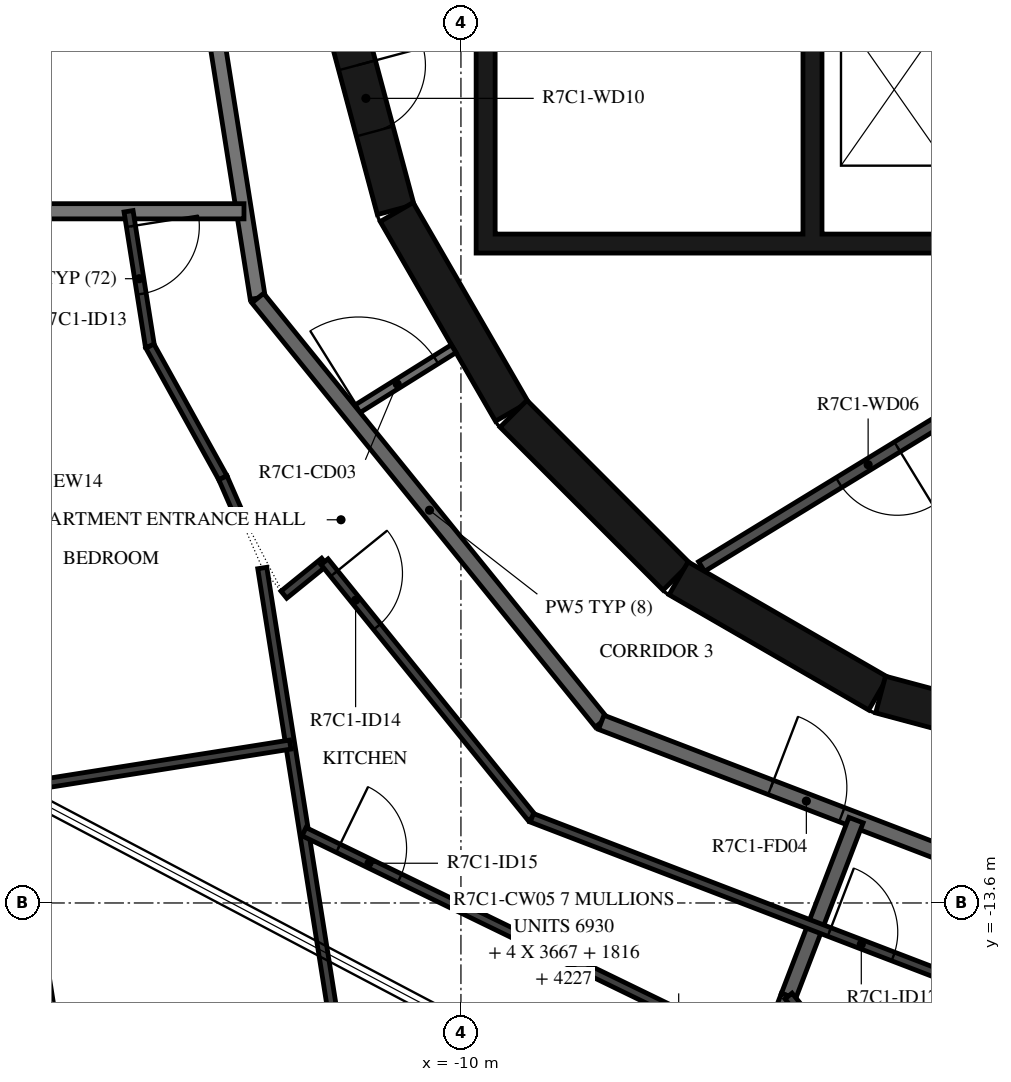
"""IFC4 building model, lengths in metres.
Left out: names, types, materials, properties, quantities, classifications, styles, units other than length and angle.
Written with IfcOpenShell. Run it as: python <this file> out.ifc"""

import sys

from ifc_helpers import new_model, si_unit, direction, frame, frame_2d, origin, place, context, subcontext, project, spatial, polyline, rectangle, outline, extrude, element, fill, save


model = new_model("IFC4")
c1 = context("Model", 3, precision=1e-05, world=origin(), true_north=direction((0.0, 1.0)))
c2 = subcontext(c1, "Body", "Model", "MODEL_VIEW")
j1 = project(units=[si_unit("LENGTHUNIT", "METRE"), si_unit("PLANEANGLEUNIT", "RADIAN")], contexts=[c1])
p1 = place(None, origin())
s1 = spatial("IfcSite", under=j1, at=p1, CompositionType="ELEMENT")
p2 = place(p1, origin())
s2 = spatial("IfcBuilding", under=s1, at=p2, CompositionType="ELEMENT")
p3 = place(p2, frame((0.0, 0.0, 287.9)))
s3 = spatial("IfcBuildingStorey", under=s2, at=p3, CompositionType="ELEMENT", Elevation=287.9)
p4 = place(p3, frame((-11.643, -1.55, 0.0), z_axis=(0.0, 0.0, 1.0), x_axis=(0.258734743916, -0.965948410781, 0.0)))
e1 = element("IfcWall", 1, at=p4, inside=s3, PredefinedType="SHEAR", context=c2, shape_type="SweptSolid", body=[
    extrude(rectangle(XDim=3.033, YDim=0.5, at=frame_2d((1.516, 0.0))), origin(), (0.0, 0.0, 1.0), 3.05),
])
p5 = place(p4, frame((1.066, 0.0, 0.0)))
e2 = element("IfcOpeningElement", 2, at=p5, cuts=e1, PredefinedType="OPENING", context=c2, shape_type="SweptSolid", body=[
    extrude(rectangle(XDim=0.9, YDim=2.1, at=frame_2d((0.45, 1.05))), frame((0.0, 0.26, 0.0), z_axis=(0.0, -1.0, 0.0), x_axis=(1.0, 0.0, 0.0)), (0.0, 0.0, 1.0), 0.52),
])
p6 = place(p3, frame((-10.845, -4.51, 0.0), z_axis=(0.0, 0.0, 1.0), x_axis=(0.500087131594, -0.865975092491, 0.0)))
e3 = element("IfcWall", 3, at=p6, inside=s3, PredefinedType="SHEAR", context=c2, shape_type="SweptSolid", body=[
    extrude(rectangle(XDim=3.033, YDim=0.5, at=frame_2d((1.516, 0.0))), origin(), (0.0, 0.0, 1.0), 3.05),
])
p7 = place(p3, frame((-9.308, -7.164, 0.0), z_axis=(0.0, 0.0, 1.0), x_axis=(0.707106781187, -0.707106781187, 0.0)))
e4 = element("IfcWall", 4, at=p7, inside=s3, PredefinedType="SHEAR", context=c2, shape_type="SweptSolid", body=[
    extrude(rectangle(XDim=3.032, YDim=0.5, at=frame_2d((1.516, 0.0))), origin(), (0.0, 0.0, 1.0), 3.05),
])
for number, where, z_axis, x_axis in (
    (5, (-7.137, -9.329, 0.0), (0.0, 0.0, 1.0), (0.866, -0.5, 0.0)),
    (6, (-4.479, -10.858, 0.0), (0.0, 0.0, 1.0), (0.966, -0.259, 0.0)),
):
    element("IfcWall", number, at=place(p3, frame(where, z_axis=z_axis, x_axis=x_axis)), inside=s3, PredefinedType="SHEAR", context=c2, shape_type="SweptSolid", body=[
        extrude(rectangle(XDim=3.033, YDim=0.5, at=frame_2d((1.516, 0.0))), origin(), (0.0, 0.0, 1.0), 3.05),
    ])
p8 = place(p3, origin())
e7 = element("IfcWall", 7, at=p8, inside=s3, PredefinedType="SHEAR", context=c2, shape_type="SweptSolid", body=[
    extrude(outline(polyline([(9.8, -5.05), (9.8, -4.8), (9.8, -1.9), (9.55, -1.9), (9.55, -4.8), (7.65, -4.8), (7.65, -1.9), (7.4, -1.9), (7.4, -4.8), (5.5, -4.8), (5.5, -1.9), (5.25, -1.9), (5.25, -4.8), (3.35, -4.8), (3.35, -1.9), (3.1, -1.9), (3.1, -4.8), (1.2, -4.8), (1.2, -1.9), (0.95, -1.9), (0.95, -4.8), (-0.95, -4.8), (-0.95, -1.9), (-1.2, -1.9), (-1.2, -4.8), (-3.1, -4.8), (-3.1, -1.9), (-3.35, -1.9), (-3.35, -4.8), (-5.25, -4.8), (-5.25, -1.9), (-5.5, -1.9), (-5.5, -4.8), (-9.55, -4.8), (-9.55, -1.9), (-9.8, -1.9), (-9.8, -4.8), (-9.8, -5.05), (9.8, -5.05)])), origin(), (0.0, 0.0, 1.0), 3.05),
])
p9 = place(p3, frame((-2.451, -6.495, 0.0), z_axis=(0.0, 0.0, 1.0), x_axis=(-0.853250115418, -0.521501908471, 0.0)))
e8 = element("IfcWall", 8, at=p9, inside=s3, PredefinedType="PARTITIONING", context=c2, shape_type="SweptSolid", body=[
    extrude(rectangle(XDim=5.137, YDim=0.15, at=frame_2d((2.569, 0.0))), origin(), (0.0, 0.0, 1.0), 3.05),
])
p10 = place(p9, frame((2.119, 0.0, 0.0)))
e9 = element("IfcOpeningElement", 9, at=p10, cuts=e8, PredefinedType="OPENING", context=c2, shape_type="SweptSolid", body=[
    extrude(rectangle(XDim=0.9, YDim=2.1, at=frame_2d((0.45, 1.05))), frame((0.0, 0.085, 0.0), z_axis=(0.0, -1.0, 0.0), x_axis=(1.0, 0.0, 0.0)), (0.0, 0.0, 1.0), 0.17),
])
p11 = place(p3, frame((-11.449, -7.154, 0.0), z_axis=(0.0, 0.0, 1.0), x_axis=(0.848067047543, 0.529888934468, 0.0)))
e10 = element("IfcWall", 10, at=p11, inside=s3, PredefinedType="PARTITIONING", context=c2, shape_type="SweptSolid", body=[
    extrude(rectangle(XDim=1.596, YDim=0.12, at=frame_2d((0.798, 0.0))), origin(), (0.0, 0.0, 1.0), 3.05),
])
p12 = place(p11, frame((0.12, 0.0, 0.0)))
e11 = element("IfcOpeningElement", 11, at=p12, cuts=e10, PredefinedType="OPENING", context=c2, shape_type="SweptSolid", body=[
    extrude(rectangle(XDim=1.2, YDim=2.1, at=frame_2d((0.6, 1.05))), frame((0.0, 0.07, 0.0), z_axis=(0.0, -1.0, 0.0), x_axis=(1.0, 0.0, 0.0)), (0.0, 0.0, 1.0), 0.14),
])
p13 = place(p3, frame((-13.797, 1.45, 0.0), z_axis=(0.0, 0.0, 1.0), x_axis=(0.156421704315, -0.987690361611, 0.0)))
e12 = element("IfcWall", 12, at=p13, inside=s3, PredefinedType="STANDARD", context=c2, shape_type="SweptSolid", body=[
    extrude(rectangle(XDim=7.181, YDim=0.2, at=frame_2d((3.591, 0.0))), origin(), (0.0, 0.0, 1.0), 3.05),
])
p14 = place(p3, frame((-12.673, -5.643, 0.0), z_axis=(0.0, 0.0, 1.0), x_axis=(0.629302871585, -0.777160148113, 0.0)))
e13 = element("IfcWall", 13, at=p14, inside=s3, PredefinedType="STANDARD", context=c2, shape_type="SweptSolid", body=[
    extrude(rectangle(XDim=7.181, YDim=0.2, at=frame_2d((3.59, 0.0))), origin(), (0.0, 0.0, 1.0), 3.05),
])
p15 = place(p3, frame((-8.154, -11.223, 0.0), z_axis=(0.0, 0.0, 1.0), x_axis=(0.93359073609, -0.358341090983, 0.0)))
e14 = element("IfcWall", 14, at=p15, inside=s3, PredefinedType="STANDARD", context=c2, shape_type="SweptSolid", body=[
    extrude(rectangle(XDim=7.181, YDim=0.2, at=frame_2d((3.59, 0.0))), origin(), (0.0, 0.0, 1.0), 3.05),
])
p16 = place(p15, frame((2.39, 0.0, 0.0)))
e15 = element("IfcOpeningElement", 15, at=p16, cuts=e14, PredefinedType="OPENING", context=c2, shape_type="SweptSolid", body=[
    extrude(rectangle(XDim=1.0, YDim=2.1, at=frame_2d((0.5, 1.05))), frame((0.0, 0.11, 0.0), z_axis=(0.0, -1.0, 0.0), x_axis=(1.0, 0.0, 0.0)), (0.0, 0.0, 1.0), 0.22),
])
p17 = place(p3, frame((-17.002, -4.5, 0.0), z_axis=(0.0, 0.0, 1.0), x_axis=(1.0, 0.0, 0.0)))
e16 = element("IfcWall", 16, at=p17, inside=s3, PredefinedType="STANDARD", context=c2, shape_type="SweptSolid", body=[
    extrude(rectangle(XDim=4.148, YDim=0.2, at=frame_2d((2.074, 0.0))), origin(), (0.0, 0.0, 1.0), 3.05),
])
p18 = place(p3, frame((-5.69, -14.824, 0.0), z_axis=(0.0, 0.0, 1.0), x_axis=(0.358345342952, 0.933589104041, 0.0)))
e17 = element("IfcWall", 17, at=p18, inside=s3, PredefinedType="STANDARD", context=c2, shape_type="SweptSolid", body=[
    extrude(rectangle(XDim=2.479, YDim=0.2, at=frame_2d((1.239, 0.0))), origin(), (0.0, 0.0, 1.0), 3.05),
])
p19 = place(p3, frame((-6.25, -16.282, 0.0), z_axis=(0.0, 0.0, 1.0), x_axis=(0.358360842469, 0.933583154617, 0.0)))
e18 = element("IfcWall", 18, at=p19, inside=s3, PredefinedType="STANDARD", context=c2, shape_type="SweptSolid", body=[
    extrude(rectangle(XDim=1.562, YDim=0.2, at=frame_2d((0.781, 0.0))), origin(), (0.0, 0.0, 1.0), 3.05),
])
p20 = place(p3, frame((-14.373, -4.5, 0.0), z_axis=(0.0, 0.0, 1.0), x_axis=(0.156437152886, -0.987687914878, 0.0)))
e19 = element("IfcWall", 19, at=p20, inside=s3, PredefinedType="PARTITIONING", context=c2, shape_type="SweptSolid", body=[
    extrude(rectangle(XDim=1.796, YDim=0.12, at=frame_2d((0.898, 0.0))), origin(), (0.0, 0.0, 1.0), 3.05),
])
p21 = place(p20, frame((0.2, 0.0, 0.0)))
e20 = element("IfcOpeningElement", 20, at=p21, cuts=e19, PredefinedType="OPENING", context=c2, shape_type="SweptSolid", body=[
    extrude(rectangle(XDim=0.9, YDim=2.1, at=frame_2d((0.45, 1.05))), frame((0.0, 0.07, 0.0), z_axis=(0.0, -1.0, 0.0), x_axis=(1.0, 0.0, 0.0)), (0.0, 0.0, 1.0), 0.14),
])
p22 = place(p3, frame((-14.092, -6.274, 0.0), z_axis=(0.0, 0.0, 1.0), x_axis=(0.484732033151, -0.87466270987, 0.0)))
e21 = element("IfcWall", 21, at=p22, inside=s3, PredefinedType="PARTITIONING", context=c2, shape_type="SweptSolid", body=[
    extrude(rectangle(XDim=1.98, YDim=0.12, at=frame_2d((0.99, 0.0))), origin(), (0.0, 0.0, 1.0), 3.05),
])
p23 = place(p3, frame((-13.132, -8.006, 0.0), z_axis=(0.0, 0.0, 1.0), x_axis=(0.400176548656, -0.916438066596, 0.0)))
e22 = element("IfcWall", 22, at=p23, inside=s3, PredefinedType="PARTITIONING", context=c2, shape_type="SweptSolid", body=[
    extrude(rectangle(XDim=0.578, YDim=0.12, at=frame_2d((0.289, 0.0))), origin(), (0.0, 0.0, 1.0), 3.05),
])
p24 = place(p3, frame((-12.33, -9.544, 0.0), z_axis=(0.0, 0.0, 1.0), x_axis=(0.777046524115, 0.629443166109, 0.0)))
e23 = element("IfcWall", 23, at=p24, inside=s3, PredefinedType="PARTITIONING", context=c2, shape_type="SweptSolid", body=[
    extrude(rectangle(XDim=0.688, YDim=0.12, at=frame_2d((0.344, 0.0))), origin(), (0.0, 0.0, 1.0), 3.05),
])
p25 = place(p3, frame((-11.795, -9.111, 0.0), z_axis=(0.0, 0.0, 1.0), x_axis=(0.62936834401, -0.777107127466, 0.0)))
e24 = element("IfcWall", 24, at=p25, inside=s3, PredefinedType="PARTITIONING", context=c2, shape_type="SweptSolid", body=[
    extrude(rectangle(XDim=4.334, YDim=0.12, at=frame_2d((2.167, 0.0))), origin(), (0.0, 0.0, 1.0), 3.05),
])
p26 = place(p25, frame((0.2, 0.0, 0.0)))
e25 = element("IfcOpeningElement", 25, at=p26, cuts=e24, PredefinedType="OPENING", context=c2, shape_type="SweptSolid", body=[
    extrude(rectangle(XDim=0.9, YDim=2.1, at=frame_2d((0.45, 1.05))), frame((0.0, 0.07, 0.0), z_axis=(0.0, -1.0, 0.0), x_axis=(1.0, 0.0, 0.0)), (0.0, 0.0, 1.0), 0.14),
])
p27 = place(p3, frame((-9.067, -12.479, 0.0), z_axis=(0.0, 0.0, 1.0), x_axis=(0.933579449035, -0.358370495911, 0.0)))
e26 = element("IfcWall", 26, at=p27, inside=s3, PredefinedType="PARTITIONING", context=c2, shape_type="SweptSolid", body=[
    extrude(rectangle(XDim=7.985, YDim=0.12, at=frame_2d((3.992, 0.0))), origin(), (0.0, 0.0, 1.0), 3.05),
])
p28 = place(p27, frame((4.192, 0.0, 0.0)))
e27 = element("IfcOpeningElement", 27, at=p28, cuts=e26, PredefinedType="OPENING", context=c2, shape_type="SweptSolid", body=[
    extrude(rectangle(XDim=0.9, YDim=2.1, at=frame_2d((0.45, 1.05))), frame((0.0, 0.07, 0.0), z_axis=(0.0, -1.0, 0.0), x_axis=(1.0, 0.0, 0.0)), (0.0, 0.0, 1.0), 0.14),
])
p29 = place(p3, frame((-11.185, -18.213, 0.0), z_axis=(0.0, 0.0, 1.0), x_axis=(-0.15642108221, 0.987690460134, 0.0)))
e28 = element("IfcWall", 28, at=p29, inside=s3, PredefinedType="PARTITIONING", context=c2, shape_type="SweptSolid", body=[
    extrude(rectangle(XDim=9.132, YDim=0.12, at=frame_2d((4.566, 0.0))), origin(), (0.0, 0.0, 1.0), 3.05),
])
p30 = place(p29, frame((1.781, 0.0, 0.0)))
e29 = element("IfcOpeningElement", 29, at=p30, cuts=e28, PredefinedType="OPENING", context=c2, shape_type="SweptSolid", body=[
    extrude(rectangle(XDim=0.9, YDim=2.1, at=frame_2d((0.45, 1.05))), frame((0.0, 0.07, 0.0), z_axis=(0.0, -1.0, 0.0), x_axis=(1.0, 0.0, 0.0)), (0.0, 0.0, 1.0), 0.14),
])
p31 = place(p3, frame((-15.802, -12.08, 0.0), z_axis=(0.0, 0.0, 1.0), x_axis=(0.987685312069, 0.156453585206, 0.0)))
e30 = element("IfcWall", 30, at=p31, inside=s3, PredefinedType="PARTITIONING", context=c2, shape_type="SweptSolid", body=[
    extrude(rectangle(XDim=3.6, YDim=0.12, at=frame_2d((1.8, 0.0))), origin(), (0.0, 0.0, 1.0), 3.05),
])
p32 = place(p3, frame((-12.064, -12.662, 0.0), z_axis=(0.0, 0.0, 1.0), x_axis=(0.899383852228, -0.437159794985, 0.0)))
e31 = element("IfcWall", 31, at=p32, inside=s3, PredefinedType="PARTITIONING", context=c2, shape_type="SweptSolid", body=[
    extrude(rectangle(XDim=6.75, YDim=0.12, at=frame_2d((3.375, 0.0))), origin(), (0.0, 0.0, 1.0), 3.05),
])
p33 = place(p32, frame((0.5, 0.0, 0.0)))
e32 = element("IfcOpeningElement", 32, at=p33, cuts=e31, PredefinedType="OPENING", context=c2, shape_type="SweptSolid", body=[
    extrude(rectangle(XDim=0.9, YDim=2.1, at=frame_2d((0.45, 1.05))), frame((0.0, 0.07, 0.0), z_axis=(0.0, -1.0, 0.0), x_axis=(1.0, 0.0, 0.0)), (0.0, 0.0, 1.0), 0.14),
])
p34 = place(p3, frame((-2.948, -18.21, 0.0), z_axis=(0.0, 0.0, 1.0), x_axis=(-0.629330389268, 0.777137864953, 0.0)))
e33 = element("IfcWall", 33, at=p34, inside=s3, PredefinedType="PARTITIONING", context=c2, shape_type="SweptSolid", body=[
    extrude(rectangle(XDim=4.357, YDim=0.12, at=frame_2d((2.179, 0.0))), origin(), (0.0, 0.0, 1.0), 3.05),
])
p35 = place(p34, frame((0.2, 0.0, 0.0)))
e34 = element("IfcOpeningElement", 34, at=p35, cuts=e33, PredefinedType="OPENING", context=c2, shape_type="SweptSolid", body=[
    extrude(rectangle(XDim=0.8, YDim=2.1, at=frame_2d((0.4, 1.05))), frame((0.0, 0.07, 0.0), z_axis=(0.0, -1.0, 0.0), x_axis=(1.0, 0.0, 0.0)), (0.0, 0.0, 1.0), 0.14),
])
p36 = place(p3, frame((-4.809, -19.717, 0.0), z_axis=(0.0, 0.0, 1.0), x_axis=(0.777140730041, 0.629326851255, 0.0)))
e35 = element("IfcWall", 35, at=p36, inside=s3, PredefinedType="PARTITIONING", context=c2, shape_type="SweptSolid", body=[
    extrude(rectangle(XDim=7.644, YDim=0.12, at=frame_2d((3.822, 0.0))), origin(), (0.0, 0.0, 1.0), 3.05),
])
p37 = place(p36, frame((2.954, 0.0, 0.0)))
e36 = element("IfcOpeningElement", 36, at=p37, cuts=e35, PredefinedType="OPENING", context=c2, shape_type="SweptSolid", body=[
    extrude(rectangle(XDim=0.9, YDim=2.1, at=frame_2d((0.45, 1.05))), frame((0.0, 0.07, 0.0), z_axis=(0.0, -1.0, 0.0), x_axis=(1.0, 0.0, 0.0)), (0.0, 0.0, 1.0), 0.14),
])
p38 = place(p10, origin())
e37 = element("IfcDoor", 37, at=p38, inside=s3, OperationType="SINGLE_SWING_RIGHT", PredefinedType="DOOR", context=c2, shape_type="SweptSolid", body=[
    extrude(rectangle(XDim=0.9, YDim=2.1, at=frame_2d((0.45, 1.05))), frame((0.0, 0.025, 0.0), z_axis=(0.0, -1.0, 0.0), x_axis=(1.0, 0.0, 0.0)), (0.0, 0.0, 1.0), 0.05),
])
fill(e9, e37)
p39 = place(p5, origin())
e38 = element("IfcDoor", 38, at=p39, inside=s3, OperationType="SINGLE_SWING_RIGHT", PredefinedType="DOOR", context=c2, shape_type="SweptSolid", body=[
    extrude(rectangle(XDim=0.9, YDim=2.1, at=frame_2d((0.45, 1.05))), frame((0.0, 0.025, 0.0), z_axis=(0.0, -1.0, 0.0), x_axis=(1.0, 0.0, 0.0)), (0.0, 0.0, 1.0), 0.05),
])
fill(e2, e38)
p40 = place(p16, origin())
e39 = element("IfcDoor", 39, at=p40, inside=s3, OperationType="SINGLE_SWING_RIGHT", PredefinedType="DOOR", context=c2, shape_type="SweptSolid", body=[
    extrude(rectangle(XDim=1.0, YDim=2.1, at=frame_2d((0.5, 1.05))), frame((0.0, 0.025, 0.0), z_axis=(0.0, -1.0, 0.0), x_axis=(1.0, 0.0, 0.0)), (0.0, 0.0, 1.0), 0.05),
])
fill(e15, e39)
p41 = place(p21, origin())
e40 = element("IfcDoor", 40, at=p41, inside=s3, OperationType="SINGLE_SWING_RIGHT", PredefinedType="DOOR", context=c2, shape_type="SweptSolid", body=[
    extrude(rectangle(XDim=0.9, YDim=2.1, at=frame_2d((0.45, 1.05))), frame((0.0, 0.025, 0.0), z_axis=(0.0, -1.0, 0.0), x_axis=(1.0, 0.0, 0.0)), (0.0, 0.0, 1.0), 0.05),
])
fill(e20, e40)
p42 = place(p26, origin())
e41 = element("IfcDoor", 41, at=p42, inside=s3, OperationType="SINGLE_SWING_RIGHT", PredefinedType="DOOR", context=c2, shape_type="SweptSolid", body=[
    extrude(rectangle(XDim=0.9, YDim=2.1, at=frame_2d((0.45, 1.05))), frame((0.0, 0.025, 0.0), z_axis=(0.0, -1.0, 0.0), x_axis=(1.0, 0.0, 0.0)), (0.0, 0.0, 1.0), 0.05),
])
fill(e25, e41)
p43 = place(p33, origin())
e42 = element("IfcDoor", 42, at=p43, inside=s3, OperationType="SINGLE_SWING_RIGHT", PredefinedType="DOOR", context=c2, shape_type="SweptSolid", body=[
    extrude(rectangle(XDim=0.9, YDim=2.1, at=frame_2d((0.45, 1.05))), frame((0.0, 0.025, 0.0), z_axis=(0.0, -1.0, 0.0), x_axis=(1.0, 0.0, 0.0)), (0.0, 0.0, 1.0), 0.05),
])
fill(e32, e42)
p44 = place(p28, origin())
e43 = element("IfcDoor", 43, at=p44, inside=s3, OperationType="SINGLE_SWING_RIGHT", PredefinedType="DOOR", context=c2, shape_type="SweptSolid", body=[
    extrude(rectangle(XDim=0.9, YDim=2.1, at=frame_2d((0.45, 1.05))), frame((0.0, 0.025, 0.0), z_axis=(0.0, -1.0, 0.0), x_axis=(1.0, 0.0, 0.0)), (0.0, 0.0, 1.0), 0.05),
])
fill(e27, e43)
p45 = place(p12, origin())
e44 = element("IfcDoor", 44, at=p45, inside=s3, OperationType="DOUBLE_DOOR_SINGLE_SWING", PredefinedType="DOOR", context=c2, shape_type="SweptSolid", body=[
    extrude(rectangle(XDim=1.2, YDim=2.1, at=frame_2d((0.6, 1.05))), frame((0.0, 0.025, 0.0), z_axis=(0.0, -1.0, 0.0), x_axis=(1.0, 0.0, 0.0)), (0.0, 0.0, 1.0), 0.05),
])
fill(e11, e44)
save(model, sys.argv[1])
